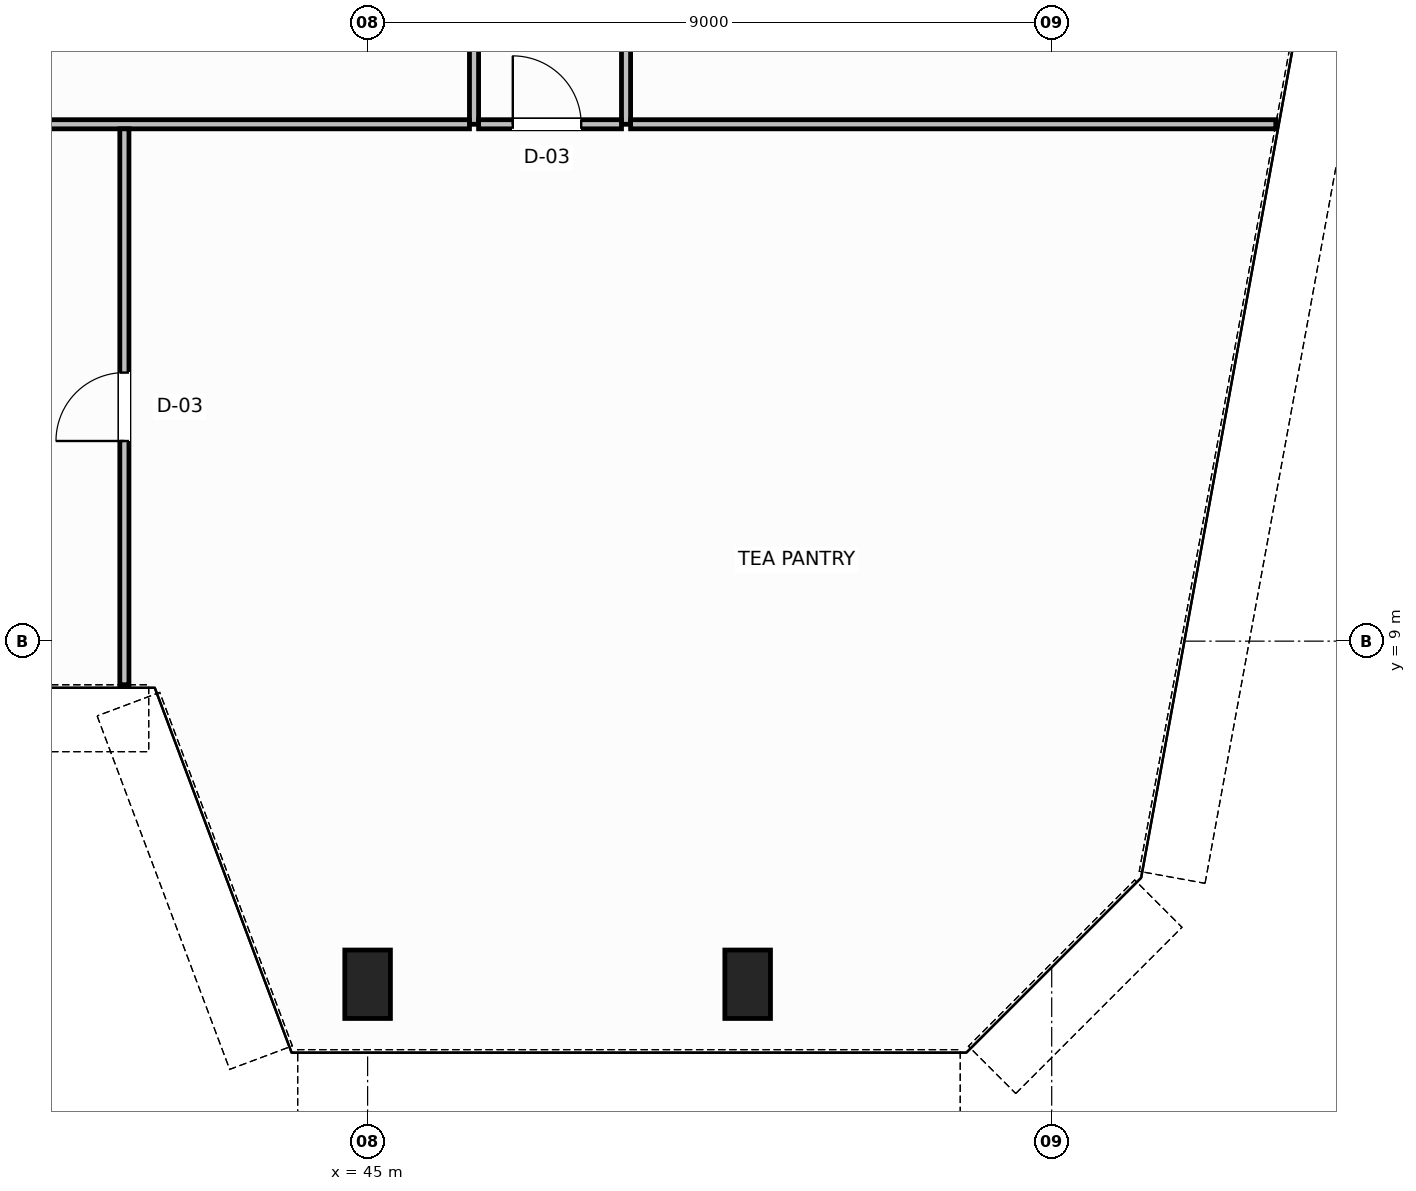
"""IFC4 building model, lengths in metres.
Left out: names, types, materials, properties, quantities, classifications, styles, units other than length and angle.
Written with IfcOpenShell. Run it as: python <this file> out.ifc"""

import sys

from ifc_helpers import new_model, si_unit, direction, frame, frame_2d, origin, origin_2d, place, context, subcontext, project, spatial, rectangle, hollow_rectangle, extrude, source, transform, mapped, element, fill, save


model = new_model("IFC4")
c1 = context("Model", 3, precision=1e-05, world=origin(), true_north=direction((0.0, 1.0)))
c2 = subcontext(c1, "Body", "Model", "MODEL_VIEW")
j1 = project(units=[si_unit("LENGTHUNIT", "METRE"), si_unit("PLANEANGLEUNIT", "RADIAN")], contexts=[c1])
p1 = place(None, origin())
s1 = spatial("IfcSite", under=j1, at=p1, CompositionType="ELEMENT")
p2 = place(p1, origin())
s2 = spatial("IfcBuilding", under=s1, at=p2, CompositionType="ELEMENT")
p3 = place(p2, frame((0.0, 0.0, 88.2)))
s3 = spatial("IfcBuildingStorey", under=s2, at=p3, CompositionType="ELEMENT", Elevation=88.2)
m1 = source(origin(), c2, "Body", "SweptSolid", [
    extrude(hollow_rectangle(XDim=0.6, YDim=0.9, WallThickness=0.04, InnerFilletRadius=0.04, OuterFilletRadius=0.08, at=origin_2d()), origin(), (0.0, 0.0, 1.0), 3.744),
])
for number, where, z_axis, x_axis in (
    (1, (45.0, 4.486, 0.032), (0.0, -0.064, 0.998), (1.0, 0.0, 0.0)),
    (2, (50.0, 4.486, 0.032), (0.0, -0.064, 0.998), (1.0, 0.0, 0.0)),
):
    element("IfcColumn", number, at=place(p3, frame(where, z_axis=z_axis, x_axis=x_axis)), inside=s3, PredefinedType="COLUMN", context=c2, shape_type="MappedRepresentation", body=[
        mapped(m1, transform((0.0, 0.0, 0.0), scale=1.0)),
    ])
p4 = place(p3, frame((46.4, 15.8, 0.0), z_axis=(0.0, 0.0, 1.0), x_axis=(0.0, 1.0, 0.0)))
e3 = element("IfcWall", 3, at=p4, inside=s3, PredefinedType="PARTITIONING", context=c2, shape_type="SweptSolid", body=[
    extrude(rectangle(XDim=18.24, YDim=0.12, at=frame_2d((9.12, 0.0))), origin(), (0.0, 0.0, 1.0), 3.58),
])
p5 = place(p3, frame((48.4, 15.8, 0.0), z_axis=(0.0, 0.0, 1.0), x_axis=(0.0, 1.0, 0.0)))
e4 = element("IfcWall", 4, at=p5, inside=s3, PredefinedType="PARTITIONING", context=c2, shape_type="SweptSolid", body=[
    extrude(rectangle(XDim=18.24, YDim=0.12, at=frame_2d((9.12, 0.0))), origin(), (0.0, 0.0, 1.0), 3.58),
])
p6 = place(p5, frame((2.85, 0.0, 0.0)))
e5 = element("IfcOpeningElement", 5, at=p6, cuts=e4, PredefinedType="OPENING", context=c2, shape_type="SweptSolid", body=[
    extrude(rectangle(XDim=0.9, YDim=2.15, at=frame_2d((0.45, 1.075))), frame((0.0, 0.07, 0.0), z_axis=(0.0, -1.0, 0.0), x_axis=(1.0, 0.0, 0.0)), (0.0, 0.0, 1.0), 0.14),
])
p7 = place(p5, frame((10.05, 0.0, 0.0)))
e6 = element("IfcOpeningElement", 6, at=p7, cuts=e4, PredefinedType="OPENING", context=c2, shape_type="SweptSolid", body=[
    extrude(rectangle(XDim=0.9, YDim=2.15, at=frame_2d((0.45, 1.075))), frame((0.0, 0.07, 0.0), z_axis=(0.0, -1.0, 0.0), x_axis=(1.0, 0.0, 0.0)), (0.0, 0.0, 1.0), 0.14),
])
p8 = place(p5, frame((15.87, 0.0, 0.0)))
e7 = element("IfcOpeningElement", 7, at=p8, cuts=e4, PredefinedType="OPENING", context=c2, shape_type="SweptSolid", body=[
    extrude(rectangle(XDim=0.9, YDim=2.15, at=frame_2d((0.45, 1.075))), frame((0.0, 0.07, 0.0), z_axis=(0.0, -1.0, 0.0), x_axis=(1.0, 0.0, 0.0)), (0.0, 0.0, 1.0), 0.14),
])
p9 = place(p3, frame((46.46, 15.8, 0.0), z_axis=(0.0, 0.0, 1.0), x_axis=(1.0, 0.0, 0.0)))
e8 = element("IfcWall", 8, at=p9, inside=s3, PredefinedType="PARTITIONING", context=c2, shape_type="SweptSolid", body=[
    extrude(rectangle(XDim=1.88, YDim=0.12, at=frame_2d((0.94, 0.0))), origin(), (0.0, 0.0, 1.0), 3.58),
])
p10 = place(p9, frame((0.45, 0.0, 0.0)))
e9 = element("IfcOpeningElement", 9, at=p10, cuts=e8, PredefinedType="OPENING", context=c2, shape_type="SweptSolid", body=[
    extrude(rectangle(XDim=0.9, YDim=2.15, at=frame_2d((0.45, 1.075))), frame((0.0, 0.07, 0.0), z_axis=(0.0, -1.0, 0.0), x_axis=(1.0, 0.0, 0.0)), (0.0, 0.0, 1.0), 0.14),
])
p11 = place(p3, frame((48.46, 15.8, 0.0), z_axis=(0.0, 0.0, 1.0), x_axis=(1.0, 0.0, 0.0)))
e10 = element("IfcWall", 10, at=p11, inside=s3, PredefinedType="PARTITIONING", context=c2, shape_type="SweptSolid", body=[
    extrude(rectangle(XDim=8.488, YDim=0.12, at=frame_2d((4.244, 0.0))), origin(), (0.0, 0.0, 1.0), 3.58),
])
p12 = place(p3, frame((21.66, 15.8, 0.0), z_axis=(0.0, 0.0, 1.0), x_axis=(1.0, 0.0, 0.0)))
e11 = element("IfcWall", 11, at=p12, inside=s3, PredefinedType="PARTITIONING", context=c2, shape_type="SweptSolid", body=[
    extrude(rectangle(XDim=24.68, YDim=0.12, at=frame_2d((12.34, 0.0))), origin(), (0.0, 0.0, 1.0), 3.58),
])
p13 = place(p3, frame((41.8, 8.426, 0.0), z_axis=(0.0, 0.0, 1.0), x_axis=(0.0, 1.0, 0.0)))
e12 = element("IfcWall", 12, at=p13, inside=s3, PredefinedType="PARTITIONING", context=c2, shape_type="SweptSolid", body=[
    extrude(rectangle(XDim=7.314, YDim=0.12, at=frame_2d((3.657, 0.0))), origin(), (0.0, 0.0, 1.0), 3.58),
])
p14 = place(p13, frame((3.207, 0.0, 0.0)))
e13 = element("IfcOpeningElement", 13, at=p14, cuts=e12, PredefinedType="OPENING", context=c2, shape_type="SweptSolid", body=[
    extrude(rectangle(XDim=0.9, YDim=2.15, at=frame_2d((0.45, 1.075))), frame((0.0, 0.07, 0.0), z_axis=(0.0, -1.0, 0.0), x_axis=(1.0, 0.0, 0.0)), (0.0, 0.0, 1.0), 0.14),
])
m2 = source(origin(), c2, "Body", "SweptSolid", [
    extrude(rectangle(XDim=0.9, YDim=2.15, at=frame_2d((0.45, 1.075))), frame((0.0, 0.025, 0.0), z_axis=(0.0, -1.0, 0.0), x_axis=(1.0, 0.0, 0.0)), (0.0, 0.0, 1.0), 0.05),
])
p15 = place(p14, origin())
e14 = element("IfcDoor", 14, at=p15, inside=s3, OperationType="SINGLE_SWING_LEFT", PredefinedType="DOOR", context=c2, shape_type="MappedRepresentation", body=[
    mapped(m2, transform((0.0, 0.0, 0.0), scale=1.0)),
])
fill(e13, e14)
p16 = place(p10, origin())
e15 = element("IfcDoor", 15, at=p16, inside=s3, OperationType="SINGLE_SWING_RIGHT", PredefinedType="DOOR", context=c2, shape_type="MappedRepresentation", body=[
    mapped(m2, transform((0.0, 0.0, 0.0), scale=1.0)),
])
fill(e9, e15)
save(model, sys.argv[1])
